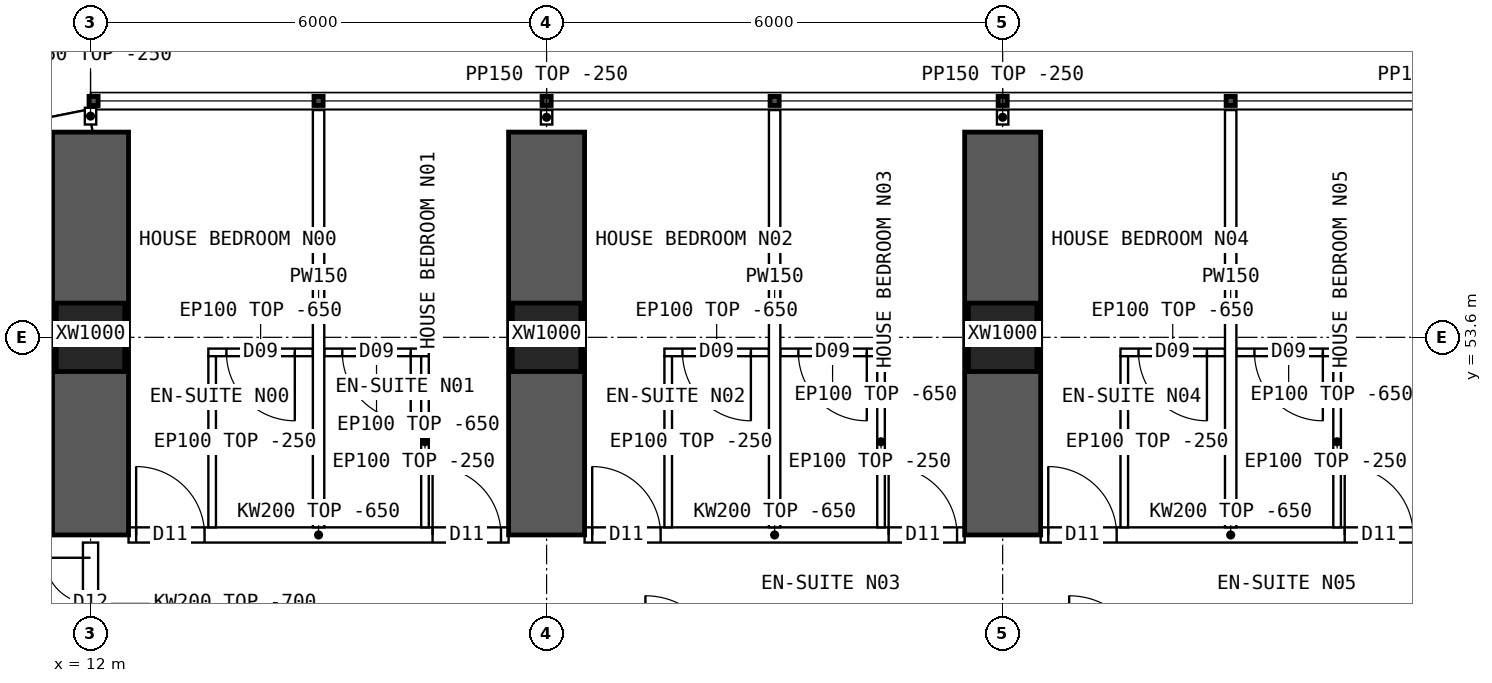
"""IFC4 building model, lengths in metres.
Left out: names, types, materials, properties, quantities, classifications, styles, units other than length and angle.
Written with IfcOpenShell. Run it as: python <this file> out.ifc"""

import sys

from ifc_helpers import new_model, si_unit, direction, frame, frame_2d, origin, origin_2d, place, context, subcontext, project, spatial, polyline, rectangle, hollow_rectangle, outline, extrude, element, fill, save


model = new_model("IFC4")
c1 = context("Model", 3, precision=1e-05, world=origin(), true_north=direction((0.0, 1.0)))
c2 = subcontext(c1, "Body", "Model", "MODEL_VIEW")
j1 = project(units=[si_unit("LENGTHUNIT", "METRE"), si_unit("PLANEANGLEUNIT", "RADIAN")], contexts=[c1])
p1 = place(None, origin())
s1 = spatial("IfcSite", under=j1, at=p1, CompositionType="ELEMENT")
p2 = place(p1, origin())
s2 = spatial("IfcBuilding", under=s1, at=p2, CompositionType="ELEMENT")
p3 = place(p2, frame((0.0, 0.0, 38.95)))
s3 = spatial("IfcBuildingStorey", under=s2, at=p3, CompositionType="ELEMENT", Elevation=38.95)
for number, where, z_axis, x_axis in (
    (1, (12.0, 53.6, 0.0), (0.0, 0.0, 1.0), (1.0, 0.0, 0.0)),
    (2, (18.0, 53.6, 0.0), (0.0, 0.0, 1.0), (1.0, 0.0, 0.0)),
    (3, (24.0, 53.6, 0.0), (0.0, 0.0, 1.0), (1.0, 0.0, 0.0)),
):
    element("IfcColumn", number, at=place(p3, frame(where, z_axis=z_axis, x_axis=x_axis)), inside=s3, PredefinedType="COLUMN", context=c2, shape_type="SweptSolid", body=[
        extrude(hollow_rectangle(XDim=0.9, YDim=0.9, WallThickness=0.09, at=origin_2d()), origin(), (0.0, 0.0, 1.0), 3.75),
    ])
for number, where, z_axis, x_axis in (
    (4, (12.0, 51.0, 0.0), (0.0, 0.0, 1.0), (0.0, 1.0, 0.0)),
    (5, (18.0, 51.0, 0.0), (0.0, 0.0, 1.0), (0.0, 1.0, 0.0)),
    (6, (24.0, 51.0, 0.0), (0.0, 0.0, 1.0), (0.0, 1.0, 0.0)),
):
    element("IfcWall", number, at=place(p3, frame(where, z_axis=z_axis, x_axis=x_axis)), inside=s3, PredefinedType="SHEAR", context=c2, shape_type="SweptSolid", body=[
        extrude(rectangle(XDim=5.3, YDim=1.0, at=frame_2d((2.65, 0.0))), origin(), (0.0, 0.0, 1.0), 3.75),
    ])
p4 = place(p3, frame((12.0, 56.45, 0.0), z_axis=(0.0, 0.0, 1.0), x_axis=(-0.980787251524, -0.195080412259, 0.0)))
e7 = element("IfcWall", 7, at=p4, inside=s3, PredefinedType="SOLIDWALL", context=c2, shape_type="SweptSolid", body=[
    extrude(outline(polyline([(-0.03, -0.15), (3.249, -0.15), (3.189, 0.15), (0.03, 0.15), (-0.03, -0.15)])), origin(), (0.0, 0.0, 1.0), 3.5),
])
p5 = place(p4, frame((0.909, 0.0, 0.9)))
e8 = element("IfcOpeningElement", 8, at=p5, cuts=e7, PredefinedType="OPENING", context=c2, shape_type="SweptSolid", body=[
    extrude(rectangle(XDim=1.4, YDim=1.8, at=frame_2d((0.7, 0.9))), frame((0.0, 0.16, 0.0), z_axis=(0.0, -1.0, 0.0), x_axis=(1.0, 0.0, 0.0)), (0.0, 0.0, 1.0), 0.32),
])
p6 = place(p3, frame((12.5, 51.0, 0.0), z_axis=(0.0, 0.0, 1.0), x_axis=(1.0, 0.0, 0.0)))
e9 = element("IfcWall", 9, at=p6, inside=s3, PredefinedType="SOLIDWALL", context=c2, shape_type="SweptSolid", body=[
    extrude(outline(polyline([(0.0, 0.0), (5.0, 0.0), (5.0, 3.1), (0.0, 3.1), (0.0, 0.0)])), frame((0.0, 0.1, 0.0), z_axis=(0.0, -1.0, 0.0), x_axis=(1.0, 0.0, 0.0)), (0.0, 0.0, 1.0), 0.2),
])
p7 = place(p6, frame((0.1, 0.0, 0.0)))
e10 = element("IfcOpeningElement", 10, at=p7, cuts=e9, PredefinedType="OPENING", context=c2, shape_type="SweptSolid", body=[
    extrude(rectangle(XDim=0.9, YDim=2.1, at=frame_2d((0.45, 1.05))), frame((0.0, 0.11, 0.0), z_axis=(0.0, -1.0, 0.0), x_axis=(1.0, 0.0, 0.0)), (0.0, 0.0, 1.0), 0.22),
])
p8 = place(p6, frame((4.0, 0.0, 0.0)))
e11 = element("IfcOpeningElement", 11, at=p8, cuts=e9, PredefinedType="OPENING", context=c2, shape_type="SweptSolid", body=[
    extrude(rectangle(XDim=0.9, YDim=2.1, at=frame_2d((0.45, 1.05))), frame((0.0, 0.11, 0.0), z_axis=(0.0, -1.0, 0.0), x_axis=(1.0, 0.0, 0.0)), (0.0, 0.0, 1.0), 0.22),
])
p9 = place(p3, frame((18.5, 51.0, 0.0), z_axis=(0.0, 0.0, 1.0), x_axis=(1.0, 0.0, 0.0)))
e12 = element("IfcWall", 12, at=p9, inside=s3, PredefinedType="SOLIDWALL", context=c2, shape_type="SweptSolid", body=[
    extrude(outline(polyline([(0.0, 0.0), (5.0, 0.0), (5.0, 3.1), (0.0, 3.1), (0.0, 0.0)])), frame((0.0, 0.1, 0.0), z_axis=(0.0, -1.0, 0.0), x_axis=(1.0, 0.0, 0.0)), (0.0, 0.0, 1.0), 0.2),
])
p10 = place(p9, frame((0.1, 0.0, 0.0)))
e13 = element("IfcOpeningElement", 13, at=p10, cuts=e12, PredefinedType="OPENING", context=c2, shape_type="SweptSolid", body=[
    extrude(rectangle(XDim=0.9, YDim=2.1, at=frame_2d((0.45, 1.05))), frame((0.0, 0.11, 0.0), z_axis=(0.0, -1.0, 0.0), x_axis=(1.0, 0.0, 0.0)), (0.0, 0.0, 1.0), 0.22),
])
p11 = place(p9, frame((4.0, 0.0, 0.0)))
e14 = element("IfcOpeningElement", 14, at=p11, cuts=e12, PredefinedType="OPENING", context=c2, shape_type="SweptSolid", body=[
    extrude(rectangle(XDim=0.9, YDim=2.1, at=frame_2d((0.45, 1.05))), frame((0.0, 0.11, 0.0), z_axis=(0.0, -1.0, 0.0), x_axis=(1.0, 0.0, 0.0)), (0.0, 0.0, 1.0), 0.22),
])
p12 = place(p3, frame((24.5, 51.0, 0.0), z_axis=(0.0, 0.0, 1.0), x_axis=(1.0, 0.0, 0.0)))
e15 = element("IfcWall", 15, at=p12, inside=s3, PredefinedType="SOLIDWALL", context=c2, shape_type="SweptSolid", body=[
    extrude(outline(polyline([(0.0, 0.0), (5.0, 0.0), (5.0, 3.1), (0.0, 3.1), (0.0, 0.0)])), frame((0.0, 0.1, 0.0), z_axis=(0.0, -1.0, 0.0), x_axis=(1.0, 0.0, 0.0)), (0.0, 0.0, 1.0), 0.2),
])
p13 = place(p12, frame((0.1, 0.0, 0.0)))
e16 = element("IfcOpeningElement", 16, at=p13, cuts=e15, PredefinedType="OPENING", context=c2, shape_type="SweptSolid", body=[
    extrude(rectangle(XDim=0.9, YDim=2.1, at=frame_2d((0.45, 1.05))), frame((0.0, 0.11, 0.0), z_axis=(0.0, -1.0, 0.0), x_axis=(1.0, 0.0, 0.0)), (0.0, 0.0, 1.0), 0.22),
])
p14 = place(p12, frame((4.0, 0.0, 0.0)))
e17 = element("IfcOpeningElement", 17, at=p14, cuts=e15, PredefinedType="OPENING", context=c2, shape_type="SweptSolid", body=[
    extrude(rectangle(XDim=0.9, YDim=2.1, at=frame_2d((0.45, 1.05))), frame((0.0, 0.11, 0.0), z_axis=(0.0, -1.0, 0.0), x_axis=(1.0, 0.0, 0.0)), (0.0, 0.0, 1.0), 0.22),
])
p15 = place(p3, frame((15.0, 56.59, 0.0), z_axis=(0.0, 0.0, 1.0), x_axis=(0.0, -1.0, 0.0)))
e18 = element("IfcWall", 18, at=p15, inside=s3, PredefinedType="PARTITIONING", context=c2, shape_type="SweptSolid", body=[
    extrude(outline(polyline([(0.0, 0.0), (5.49, 0.0), (5.49, 3.1), (5.442, 3.1), (5.44, 3.5), (3.192, 3.5), (3.19, 3.1), (2.792, 3.1), (2.79, 3.5), (0.0, 3.5), (0.0, 0.0)])), frame((0.0, 0.075, 0.0), z_axis=(0.0, -1.0, 0.0), x_axis=(1.0, 0.0, 0.0)), (0.0, 0.0, 1.0), 0.15),
])
p16 = place(p3, frame((13.55, 53.402, 0.0), z_axis=(0.0, 0.0, 1.0), x_axis=(1.0, 0.0, 0.0)))
e19 = element("IfcWall", 19, at=p16, inside=s3, PredefinedType="PARTITIONING", context=c2, shape_type="SweptSolid", body=[
    extrude(outline(polyline([(0.0, 0.0), (1.375, 0.0), (1.375, 3.1), (0.0, 3.1), (0.0, 0.0)])), frame((0.0, 0.05, 0.0), z_axis=(0.0, -1.0, 0.0), x_axis=(1.0, 0.0, 0.0)), (0.0, 0.0, 1.0), 0.1),
])
p17 = place(p16, frame((0.238, 0.0, 0.0)))
e20 = element("IfcOpeningElement", 20, at=p17, cuts=e19, PredefinedType="OPENING", context=c2, shape_type="SweptSolid", body=[
    extrude(rectangle(XDim=0.9, YDim=2.1, at=frame_2d((0.45, 1.05))), frame((0.0, 0.06, 0.0), z_axis=(0.0, -1.0, 0.0), x_axis=(1.0, 0.0, 0.0)), (0.0, 0.0, 1.0), 0.12),
])
p18 = place(p3, frame((13.6, 53.352, 0.0), z_axis=(0.0, 0.0, 1.0), x_axis=(0.0, -1.0, 0.0)))
e21 = element("IfcWall", 21, at=p18, inside=s3, PredefinedType="PARTITIONING", context=c2, shape_type="SweptSolid", body=[
    extrude(outline(polyline([(0.0, 0.0), (2.252, 0.0), (2.252, 3.1), (2.204, 3.1), (2.202, 3.5), (0.0, 3.5), (0.0, 0.0)])), frame((0.0, 0.05, 0.0), z_axis=(0.0, -1.0, 0.0), x_axis=(1.0, 0.0, 0.0)), (0.0, 0.0, 1.0), 0.1),
])
p19 = place(p3, frame((15.075, 53.402, 0.0), z_axis=(0.0, 0.0, 1.0), x_axis=(1.0, 0.0, 0.0)))
e22 = element("IfcWall", 22, at=p19, inside=s3, PredefinedType="PARTITIONING", context=c2, shape_type="SweptSolid", body=[
    extrude(outline(polyline([(0.0, 0.0), (1.375, 0.0), (1.375, 3.1), (0.0, 3.1), (0.0, 0.0)])), frame((0.0, 0.05, 0.0), z_axis=(0.0, -1.0, 0.0), x_axis=(1.0, 0.0, 0.0)), (0.0, 0.0, 1.0), 0.1),
])
p20 = place(p19, frame((0.238, 0.0, 0.0)))
e23 = element("IfcOpeningElement", 23, at=p20, cuts=e22, PredefinedType="OPENING", context=c2, shape_type="SweptSolid", body=[
    extrude(rectangle(XDim=0.9, YDim=2.1, at=frame_2d((0.45, 1.05))), frame((0.0, 0.06, 0.0), z_axis=(0.0, -1.0, 0.0), x_axis=(1.0, 0.0, 0.0)), (0.0, 0.0, 1.0), 0.12),
])
p21 = place(p3, frame((16.4, 53.352, 0.0), z_axis=(0.0, 0.0, 1.0), x_axis=(0.0, -1.0, 0.0)))
e24 = element("IfcWall", 24, at=p21, inside=s3, PredefinedType="PARTITIONING", context=c2, shape_type="SweptSolid", body=[
    extrude(outline(polyline([(0.0, 0.0), (2.252, 0.0), (2.252, 3.1), (2.204, 3.1), (2.202, 3.5), (0.0, 3.5), (0.0, 0.0)])), frame((0.0, 0.05, 0.0), z_axis=(0.0, -1.0, 0.0), x_axis=(1.0, 0.0, 0.0)), (0.0, 0.0, 1.0), 0.1),
])
p22 = place(p3, frame((21.0, 56.59, 0.0), z_axis=(0.0, 0.0, 1.0), x_axis=(0.0, -1.0, 0.0)))
e25 = element("IfcWall", 25, at=p22, inside=s3, PredefinedType="PARTITIONING", context=c2, shape_type="SweptSolid", body=[
    extrude(outline(polyline([(0.0, 0.0), (5.49, 0.0), (5.49, 3.1), (5.442, 3.1), (5.44, 3.5), (3.192, 3.5), (3.19, 3.1), (2.792, 3.1), (2.79, 3.5), (0.0, 3.5), (0.0, 0.0)])), frame((0.0, 0.075, 0.0), z_axis=(0.0, -1.0, 0.0), x_axis=(1.0, 0.0, 0.0)), (0.0, 0.0, 1.0), 0.15),
])
p23 = place(p3, frame((19.55, 53.402, 0.0), z_axis=(0.0, 0.0, 1.0), x_axis=(1.0, 0.0, 0.0)))
e26 = element("IfcWall", 26, at=p23, inside=s3, PredefinedType="PARTITIONING", context=c2, shape_type="SweptSolid", body=[
    extrude(outline(polyline([(0.0, 0.0), (1.375, 0.0), (1.375, 3.1), (0.0, 3.1), (0.0, 0.0)])), frame((0.0, 0.05, 0.0), z_axis=(0.0, -1.0, 0.0), x_axis=(1.0, 0.0, 0.0)), (0.0, 0.0, 1.0), 0.1),
])
p24 = place(p23, frame((0.238, 0.0, 0.0)))
e27 = element("IfcOpeningElement", 27, at=p24, cuts=e26, PredefinedType="OPENING", context=c2, shape_type="SweptSolid", body=[
    extrude(rectangle(XDim=0.9, YDim=2.1, at=frame_2d((0.45, 1.05))), frame((0.0, 0.06, 0.0), z_axis=(0.0, -1.0, 0.0), x_axis=(1.0, 0.0, 0.0)), (0.0, 0.0, 1.0), 0.12),
])
p25 = place(p3, frame((19.6, 53.352, 0.0), z_axis=(0.0, 0.0, 1.0), x_axis=(0.0, -1.0, 0.0)))
e28 = element("IfcWall", 28, at=p25, inside=s3, PredefinedType="PARTITIONING", context=c2, shape_type="SweptSolid", body=[
    extrude(outline(polyline([(0.0, 0.0), (2.252, 0.0), (2.252, 3.1), (2.204, 3.1), (2.202, 3.5), (0.0, 3.5), (0.0, 0.0)])), frame((0.0, 0.05, 0.0), z_axis=(0.0, -1.0, 0.0), x_axis=(1.0, 0.0, 0.0)), (0.0, 0.0, 1.0), 0.1),
])
p26 = place(p3, frame((21.075, 53.402, 0.0), z_axis=(0.0, 0.0, 1.0), x_axis=(1.0, 0.0, 0.0)))
e29 = element("IfcWall", 29, at=p26, inside=s3, PredefinedType="PARTITIONING", context=c2, shape_type="SweptSolid", body=[
    extrude(outline(polyline([(0.0, 0.0), (1.375, 0.0), (1.375, 3.1), (0.0, 3.1), (0.0, 0.0)])), frame((0.0, 0.05, 0.0), z_axis=(0.0, -1.0, 0.0), x_axis=(1.0, 0.0, 0.0)), (0.0, 0.0, 1.0), 0.1),
])
p27 = place(p26, frame((0.238, 0.0, 0.0)))
e30 = element("IfcOpeningElement", 30, at=p27, cuts=e29, PredefinedType="OPENING", context=c2, shape_type="SweptSolid", body=[
    extrude(rectangle(XDim=0.9, YDim=2.1, at=frame_2d((0.45, 1.05))), frame((0.0, 0.06, 0.0), z_axis=(0.0, -1.0, 0.0), x_axis=(1.0, 0.0, 0.0)), (0.0, 0.0, 1.0), 0.12),
])
p28 = place(p3, frame((22.4, 53.352, 0.0), z_axis=(0.0, 0.0, 1.0), x_axis=(0.0, -1.0, 0.0)))
e31 = element("IfcWall", 31, at=p28, inside=s3, PredefinedType="PARTITIONING", context=c2, shape_type="SweptSolid", body=[
    extrude(outline(polyline([(0.0, 0.0), (2.252, 0.0), (2.252, 3.1), (2.204, 3.1), (2.202, 3.5), (0.0, 3.5), (0.0, 0.0)])), frame((0.0, 0.05, 0.0), z_axis=(0.0, -1.0, 0.0), x_axis=(1.0, 0.0, 0.0)), (0.0, 0.0, 1.0), 0.1),
])
p29 = place(p3, frame((27.0, 56.59, 0.0), z_axis=(0.0, 0.0, 1.0), x_axis=(0.0, -1.0, 0.0)))
e32 = element("IfcWall", 32, at=p29, inside=s3, PredefinedType="PARTITIONING", context=c2, shape_type="SweptSolid", body=[
    extrude(outline(polyline([(0.0, 0.0), (5.49, 0.0), (5.49, 3.1), (5.442, 3.1), (5.44, 3.5), (3.192, 3.5), (3.19, 3.1), (2.792, 3.1), (2.79, 3.5), (0.0, 3.5), (0.0, 0.0)])), frame((0.0, 0.075, 0.0), z_axis=(0.0, -1.0, 0.0), x_axis=(1.0, 0.0, 0.0)), (0.0, 0.0, 1.0), 0.15),
])
p30 = place(p3, frame((25.55, 53.402, 0.0), z_axis=(0.0, 0.0, 1.0), x_axis=(1.0, 0.0, 0.0)))
e33 = element("IfcWall", 33, at=p30, inside=s3, PredefinedType="PARTITIONING", context=c2, shape_type="SweptSolid", body=[
    extrude(outline(polyline([(0.0, 0.0), (1.375, 0.0), (1.375, 3.1), (0.0, 3.1), (0.0, 0.0)])), frame((0.0, 0.05, 0.0), z_axis=(0.0, -1.0, 0.0), x_axis=(1.0, 0.0, 0.0)), (0.0, 0.0, 1.0), 0.1),
])
p31 = place(p30, frame((0.238, 0.0, 0.0)))
e34 = element("IfcOpeningElement", 34, at=p31, cuts=e33, PredefinedType="OPENING", context=c2, shape_type="SweptSolid", body=[
    extrude(rectangle(XDim=0.9, YDim=2.1, at=frame_2d((0.45, 1.05))), frame((0.0, 0.06, 0.0), z_axis=(0.0, -1.0, 0.0), x_axis=(1.0, 0.0, 0.0)), (0.0, 0.0, 1.0), 0.12),
])
p32 = place(p3, frame((25.6, 53.352, 0.0), z_axis=(0.0, 0.0, 1.0), x_axis=(0.0, -1.0, 0.0)))
e35 = element("IfcWall", 35, at=p32, inside=s3, PredefinedType="PARTITIONING", context=c2, shape_type="SweptSolid", body=[
    extrude(outline(polyline([(0.0, 0.0), (2.252, 0.0), (2.252, 3.1), (2.204, 3.1), (2.202, 3.5), (0.0, 3.5), (0.0, 0.0)])), frame((0.0, 0.05, 0.0), z_axis=(0.0, -1.0, 0.0), x_axis=(1.0, 0.0, 0.0)), (0.0, 0.0, 1.0), 0.1),
])
p33 = place(p3, frame((27.075, 53.402, 0.0), z_axis=(0.0, 0.0, 1.0), x_axis=(1.0, 0.0, 0.0)))
e36 = element("IfcWall", 36, at=p33, inside=s3, PredefinedType="PARTITIONING", context=c2, shape_type="SweptSolid", body=[
    extrude(outline(polyline([(0.0, 0.0), (1.375, 0.0), (1.375, 3.1), (0.0, 3.1), (0.0, 0.0)])), frame((0.0, 0.05, 0.0), z_axis=(0.0, -1.0, 0.0), x_axis=(1.0, 0.0, 0.0)), (0.0, 0.0, 1.0), 0.1),
])
p34 = place(p33, frame((0.238, 0.0, 0.0)))
e37 = element("IfcOpeningElement", 37, at=p34, cuts=e36, PredefinedType="OPENING", context=c2, shape_type="SweptSolid", body=[
    extrude(rectangle(XDim=0.9, YDim=2.1, at=frame_2d((0.45, 1.05))), frame((0.0, 0.06, 0.0), z_axis=(0.0, -1.0, 0.0), x_axis=(1.0, 0.0, 0.0)), (0.0, 0.0, 1.0), 0.12),
])
p35 = place(p3, frame((28.4, 53.352, 0.0), z_axis=(0.0, 0.0, 1.0), x_axis=(0.0, -1.0, 0.0)))
e38 = element("IfcWall", 38, at=p35, inside=s3, PredefinedType="PARTITIONING", context=c2, shape_type="SweptSolid", body=[
    extrude(outline(polyline([(0.0, 0.0), (2.252, 0.0), (2.252, 3.1), (2.204, 3.1), (2.202, 3.5), (0.0, 3.5), (0.0, 0.0)])), frame((0.0, 0.05, 0.0), z_axis=(0.0, -1.0, 0.0), x_axis=(1.0, 0.0, 0.0)), (0.0, 0.0, 1.0), 0.1),
])
p36 = place(p3, frame((12.0, 49.3, 0.0), z_axis=(0.0, 0.0, 1.0), x_axis=(0.0, 1.0, 0.0)))
e39 = element("IfcWall", 39, at=p36, inside=s3, PredefinedType="SOLIDWALL", context=c2, shape_type="SweptSolid", body=[
    extrude(outline(polyline([(0.0, 0.0), (1.6, 0.0), (1.6, 3.05), (0.0, 3.05), (0.0, 0.0)])), frame((0.0, 0.1, 0.0), z_axis=(0.0, -1.0, 0.0), x_axis=(1.0, 0.0, 0.0)), (0.0, 0.0, 1.0), 0.2),
])
p37 = place(p36, frame((0.2, 0.0, 0.0)))
e40 = element("IfcOpeningElement", 40, at=p37, cuts=e39, PredefinedType="OPENING", context=c2, shape_type="SweptSolid", body=[
    extrude(rectangle(XDim=1.2, YDim=2.1, at=frame_2d((0.6, 1.05))), frame((0.0, 0.11, 0.0), z_axis=(0.0, -1.0, 0.0), x_axis=(1.0, 0.0, 0.0)), (0.0, 0.0, 1.0), 0.22),
])
p38 = place(p3, frame((12.0, 56.4, 0.0), z_axis=(0.0, 0.0, 1.0), x_axis=(0.0, 1.0, 0.0)))
e41 = element("IfcWall", 41, at=p38, inside=s3, PredefinedType="PARTITIONING", context=c2, shape_type="SweptSolid", body=[
    extrude(rectangle(XDim=0.22, YDim=0.15, at=frame_2d((0.11, 0.0))), origin(), (0.0, 0.0, 1.0), 3.5),
])
for number, where, z_axis, x_axis in (
    (42, (18.0, 56.4, 0.0), (0.0, 0.0, 1.0), (0.0, 1.0, 0.0)),
    (43, (24.0, 56.4, 0.0), (0.0, 0.0, 1.0), (0.0, 1.0, 0.0)),
):
    element("IfcWall", number, at=place(p3, frame(where, z_axis=z_axis, x_axis=x_axis)), inside=s3, PredefinedType="PARTITIONING", context=c2, shape_type="SweptSolid", body=[
        extrude(rectangle(XDim=0.19, YDim=0.15, at=frame_2d((0.095, 0.0))), origin(), (0.0, 0.0, 1.0), 3.5),
    ])
p39 = place(p17, origin())
e44 = element("IfcDoor", 44, at=p39, inside=s3, OperationType="SINGLE_SWING_RIGHT", PredefinedType="DOOR", context=c2, shape_type="SweptSolid", body=[
    extrude(rectangle(XDim=0.9, YDim=2.1, at=frame_2d((0.45, 1.05))), frame((0.0, 0.025, 0.0), z_axis=(0.0, -1.0, 0.0), x_axis=(1.0, 0.0, 0.0)), (0.0, 0.0, 1.0), 0.05),
])
fill(e20, e44)
p40 = place(p7, origin())
e45 = element("IfcDoor", 45, at=p40, inside=s3, OperationType="SINGLE_SWING_LEFT", PredefinedType="DOOR", context=c2, shape_type="SweptSolid", body=[
    extrude(rectangle(XDim=0.9, YDim=2.1, at=frame_2d((0.45, 1.05))), frame((0.0, 0.025, 0.0), z_axis=(0.0, -1.0, 0.0), x_axis=(1.0, 0.0, 0.0)), (0.0, 0.0, 1.0), 0.05),
])
fill(e10, e45)
p41 = place(p20, origin())
e46 = element("IfcDoor", 46, at=p41, inside=s3, OperationType="SINGLE_SWING_RIGHT", PredefinedType="DOOR", context=c2, shape_type="SweptSolid", body=[
    extrude(rectangle(XDim=0.9, YDim=2.1, at=frame_2d((0.45, 1.05))), frame((0.0, 0.025, 0.0), z_axis=(0.0, -1.0, 0.0), x_axis=(1.0, 0.0, 0.0)), (0.0, 0.0, 1.0), 0.05),
])
fill(e23, e46)
p42 = place(p8, origin())
e47 = element("IfcDoor", 47, at=p42, inside=s3, OperationType="SINGLE_SWING_LEFT", PredefinedType="DOOR", context=c2, shape_type="SweptSolid", body=[
    extrude(rectangle(XDim=0.9, YDim=2.1, at=frame_2d((0.45, 1.05))), frame((0.0, 0.025, 0.0), z_axis=(0.0, -1.0, 0.0), x_axis=(1.0, 0.0, 0.0)), (0.0, 0.0, 1.0), 0.05),
])
fill(e11, e47)
p43 = place(p24, origin())
e48 = element("IfcDoor", 48, at=p43, inside=s3, OperationType="SINGLE_SWING_RIGHT", PredefinedType="DOOR", context=c2, shape_type="SweptSolid", body=[
    extrude(rectangle(XDim=0.9, YDim=2.1, at=frame_2d((0.45, 1.05))), frame((0.0, 0.025, 0.0), z_axis=(0.0, -1.0, 0.0), x_axis=(1.0, 0.0, 0.0)), (0.0, 0.0, 1.0), 0.05),
])
fill(e27, e48)
p44 = place(p10, origin())
e49 = element("IfcDoor", 49, at=p44, inside=s3, OperationType="SINGLE_SWING_LEFT", PredefinedType="DOOR", context=c2, shape_type="SweptSolid", body=[
    extrude(rectangle(XDim=0.9, YDim=2.1, at=frame_2d((0.45, 1.05))), frame((0.0, 0.025, 0.0), z_axis=(0.0, -1.0, 0.0), x_axis=(1.0, 0.0, 0.0)), (0.0, 0.0, 1.0), 0.05),
])
fill(e13, e49)
p45 = place(p27, origin())
e50 = element("IfcDoor", 50, at=p45, inside=s3, OperationType="SINGLE_SWING_RIGHT", PredefinedType="DOOR", context=c2, shape_type="SweptSolid", body=[
    extrude(rectangle(XDim=0.9, YDim=2.1, at=frame_2d((0.45, 1.05))), frame((0.0, 0.025, 0.0), z_axis=(0.0, -1.0, 0.0), x_axis=(1.0, 0.0, 0.0)), (0.0, 0.0, 1.0), 0.05),
])
fill(e30, e50)
p46 = place(p11, origin())
e51 = element("IfcDoor", 51, at=p46, inside=s3, OperationType="SINGLE_SWING_LEFT", PredefinedType="DOOR", context=c2, shape_type="SweptSolid", body=[
    extrude(rectangle(XDim=0.9, YDim=2.1, at=frame_2d((0.45, 1.05))), frame((0.0, 0.025, 0.0), z_axis=(0.0, -1.0, 0.0), x_axis=(1.0, 0.0, 0.0)), (0.0, 0.0, 1.0), 0.05),
])
fill(e14, e51)
p47 = place(p31, origin())
e52 = element("IfcDoor", 52, at=p47, inside=s3, OperationType="SINGLE_SWING_RIGHT", PredefinedType="DOOR", context=c2, shape_type="SweptSolid", body=[
    extrude(rectangle(XDim=0.9, YDim=2.1, at=frame_2d((0.45, 1.05))), frame((0.0, 0.025, 0.0), z_axis=(0.0, -1.0, 0.0), x_axis=(1.0, 0.0, 0.0)), (0.0, 0.0, 1.0), 0.05),
])
fill(e34, e52)
p48 = place(p13, origin())
e53 = element("IfcDoor", 53, at=p48, inside=s3, OperationType="SINGLE_SWING_LEFT", PredefinedType="DOOR", context=c2, shape_type="SweptSolid", body=[
    extrude(rectangle(XDim=0.9, YDim=2.1, at=frame_2d((0.45, 1.05))), frame((0.0, 0.025, 0.0), z_axis=(0.0, -1.0, 0.0), x_axis=(1.0, 0.0, 0.0)), (0.0, 0.0, 1.0), 0.05),
])
fill(e16, e53)
p49 = place(p34, origin())
e54 = element("IfcDoor", 54, at=p49, inside=s3, OperationType="SINGLE_SWING_RIGHT", PredefinedType="DOOR", context=c2, shape_type="SweptSolid", body=[
    extrude(rectangle(XDim=0.9, YDim=2.1, at=frame_2d((0.45, 1.05))), frame((0.0, 0.025, 0.0), z_axis=(0.0, -1.0, 0.0), x_axis=(1.0, 0.0, 0.0)), (0.0, 0.0, 1.0), 0.05),
])
fill(e37, e54)
p50 = place(p14, origin())
e55 = element("IfcDoor", 55, at=p50, inside=s3, OperationType="SINGLE_SWING_LEFT", PredefinedType="DOOR", context=c2, shape_type="SweptSolid", body=[
    extrude(rectangle(XDim=0.9, YDim=2.1, at=frame_2d((0.45, 1.05))), frame((0.0, 0.025, 0.0), z_axis=(0.0, -1.0, 0.0), x_axis=(1.0, 0.0, 0.0)), (0.0, 0.0, 1.0), 0.05),
])
fill(e17, e55)
p51 = place(p37, origin())
e56 = element("IfcDoor", 56, at=p51, inside=s3, OperationType="DOUBLE_DOOR_SINGLE_SWING", PredefinedType="DOOR", context=c2, shape_type="SweptSolid", body=[
    extrude(rectangle(XDim=1.2, YDim=2.1, at=frame_2d((0.6, 1.05))), frame((0.0, 0.025, 0.0), z_axis=(0.0, -1.0, 0.0), x_axis=(1.0, 0.0, 0.0)), (0.0, 0.0, 1.0), 0.05),
])
fill(e40, e56)
save(model, sys.argv[1])
